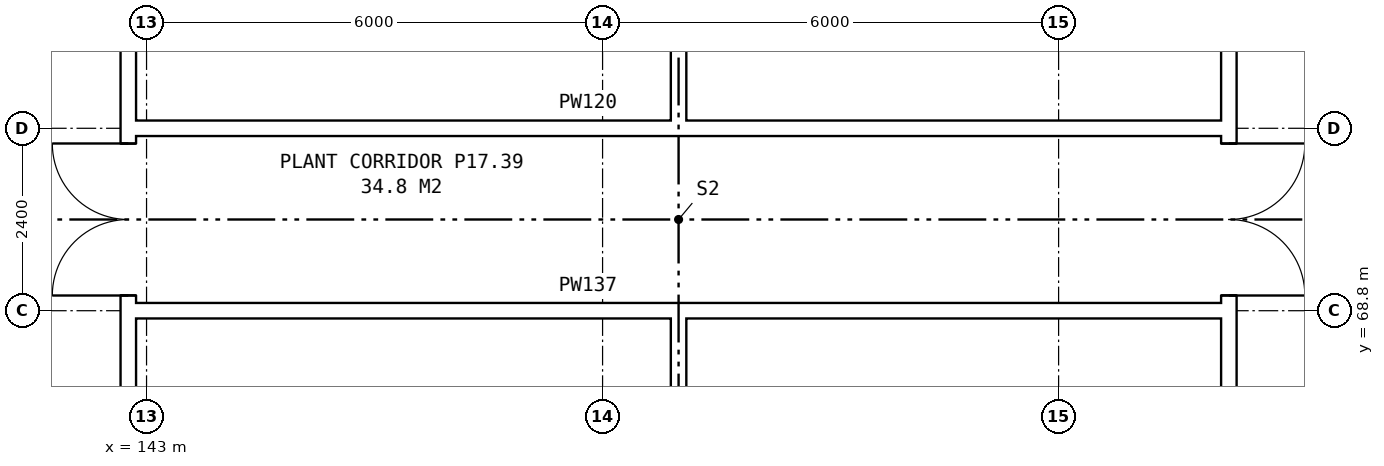
"""IFC4 building model, lengths in metres.
Left out: names, types, materials, properties, quantities, classifications, styles, units other than length and angle.
Written with IfcOpenShell. Run it as: python <this file> out.ifc"""

import sys

from ifc_helpers import new_model, si_unit, direction, frame, frame_2d, origin, place, context, subcontext, project, spatial, rectangle, extrude, element, fill, save


model = new_model("IFC4")
c1 = context("Model", 3, precision=1e-05, world=origin(), true_north=direction((0.0, 1.0)))
c2 = subcontext(c1, "Body", "Model", "MODEL_VIEW")
j1 = project(units=[si_unit("LENGTHUNIT", "METRE"), si_unit("PLANEANGLEUNIT", "RADIAN")], contexts=[c1])
p1 = place(None, origin())
s1 = spatial("IfcSite", under=j1, at=p1, CompositionType="ELEMENT")
p2 = place(p1, origin())
s2 = spatial("IfcBuilding", under=s1, at=p2, CompositionType="ELEMENT")
p3 = place(p2, frame((0.0, 0.0, 62.9)))
s3 = spatial("IfcBuildingStorey", under=s2, at=p3, CompositionType="ELEMENT", Elevation=62.9)
p4 = place(p3, frame((142.76, 63.9, 0.0), z_axis=(0.0, 0.0, 1.0), x_axis=(0.0, 1.0, 0.0)))
e1 = element("IfcWall", 1, at=p4, inside=s3, PredefinedType="PARTITIONING", context=c2, shape_type="SweptSolid", body=[
    extrude(rectangle(XDim=12.2, YDim=0.2, at=frame_2d((6.1, 0.0))), origin(), (0.0, 0.0, 1.0), 4.2),
])
p5 = place(p4, frame((5.1, 0.0, 0.0)))
e2 = element("IfcOpeningElement", 2, at=p5, cuts=e1, PredefinedType="OPENING", context=c2, shape_type="SweptSolid", body=[
    extrude(rectangle(XDim=2.0, YDim=2.1, at=frame_2d((1.0, 1.05))), frame((0.0, 0.11, 0.0), z_axis=(0.0, -1.0, 0.0), x_axis=(1.0, 0.0, 0.0)), (0.0, 0.0, 1.0), 0.22),
])
p6 = place(p3, frame((157.24, 63.9, 0.0), z_axis=(0.0, 0.0, 1.0), x_axis=(0.0, 1.0, 0.0)))
e3 = element("IfcWall", 3, at=p6, inside=s3, PredefinedType="PARTITIONING", context=c2, shape_type="SweptSolid", body=[
    extrude(rectangle(XDim=12.2, YDim=0.2, at=frame_2d((6.1, 0.0))), origin(), (0.0, 0.0, 1.0), 4.2),
])
p7 = place(p6, frame((5.1, 0.0, 0.0)))
e4 = element("IfcOpeningElement", 4, at=p7, cuts=e3, PredefinedType="OPENING", context=c2, shape_type="SweptSolid", body=[
    extrude(rectangle(XDim=2.0, YDim=2.1, at=frame_2d((1.0, 1.05))), frame((0.0, 0.11, 0.0), z_axis=(0.0, -1.0, 0.0), x_axis=(1.0, 0.0, 0.0)), (0.0, 0.0, 1.0), 0.22),
])
for number, where, z_axis, x_axis in (
    (5, (142.76, 68.8, 0.0), (0.0, 0.0, 1.0), (1.0, 0.0, 0.0)),
    (6, (142.76, 71.2, 0.0), (0.0, 0.0, 1.0), (1.0, 0.0, 0.0)),
):
    element("IfcWall", number, at=place(p3, frame(where, z_axis=z_axis, x_axis=x_axis)), inside=s3, PredefinedType="PARTITIONING", context=c2, shape_type="SweptSolid", body=[
        extrude(rectangle(XDim=14.48, YDim=0.2, at=frame_2d((7.24, 0.0))), origin(), (0.0, 0.0, 1.0), 4.2),
    ])
for number, where, z_axis, x_axis in (
    (7, (150.0, 63.7, 0.0), (0.0, 0.0, 1.0), (0.0, 1.0, 0.0)),
    (8, (150.0, 71.1, 0.0), (0.0, 0.0, 1.0), (0.0, 1.0, 0.0)),
):
    element("IfcWall", number, at=place(p3, frame(where, z_axis=z_axis, x_axis=x_axis)), inside=s3, PredefinedType="PARTITIONING", context=c2, shape_type="SweptSolid", body=[
        extrude(rectangle(XDim=5.2, YDim=0.2, at=frame_2d((2.6, 0.0))), origin(), (0.0, 0.0, 1.0), 4.2),
    ])
p8 = place(p5, origin())
e9 = element("IfcDoor", 9, at=p8, inside=s3, OperationType="DOUBLE_DOOR_SINGLE_SWING", PredefinedType="DOOR", context=c2, shape_type="SweptSolid", body=[
    extrude(rectangle(XDim=2.0, YDim=2.1, at=frame_2d((1.0, 1.05))), frame((0.0, 0.025, 0.0), z_axis=(0.0, -1.0, 0.0), x_axis=(1.0, 0.0, 0.0)), (0.0, 0.0, 1.0), 0.05),
])
fill(e2, e9)
p9 = place(p7, frame((2.0, 0.0, 0.0), z_axis=(0.0, 0.0, 1.0), x_axis=(-1.0, 0.0, 0.0)))
e10 = element("IfcDoor", 10, at=p9, inside=s3, OperationType="DOUBLE_DOOR_SINGLE_SWING", PredefinedType="DOOR", context=c2, shape_type="SweptSolid", body=[
    extrude(rectangle(XDim=2.0, YDim=2.1, at=frame_2d((1.0, 1.05))), frame((0.0, 0.025, 0.0), z_axis=(0.0, -1.0, 0.0), x_axis=(1.0, 0.0, 0.0)), (0.0, 0.0, 1.0), 0.05),
])
fill(e4, e10)
save(model, sys.argv[1])
